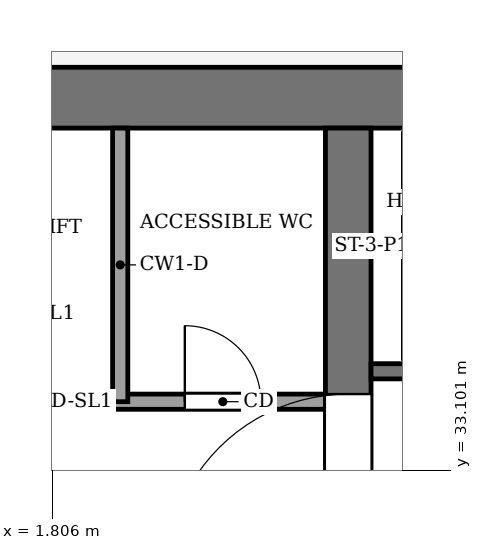
"""IFC4 building model, lengths in metres.
Left out: names, types, materials, properties, quantities, classifications, styles, units other than length and angle.
Written with IfcOpenShell. Run it as: python <this file> out.ifc"""

import sys

from ifc_helpers import new_model, si_unit, direction, frame, frame_2d, origin, place, context, subcontext, project, spatial, rectangle, extrude, element, fill, save


model = new_model("IFC4")
c1 = context("Model", 3, precision=1e-05, world=origin(), true_north=direction((0.0, 1.0)))
c2 = subcontext(c1, "Body", "Model", "MODEL_VIEW")
j1 = project(units=[si_unit("LENGTHUNIT", "METRE"), si_unit("PLANEANGLEUNIT", "RADIAN")], contexts=[c1])
p1 = place(None, origin())
s1 = spatial("IfcSite", under=j1, at=p1, CompositionType="ELEMENT")
p2 = place(p1, origin())
s2 = spatial("IfcBuilding", under=s1, at=p2, CompositionType="ELEMENT")
p3 = place(p2, frame((0.0, 0.0, 233.0)))
s3 = spatial("IfcBuildingStorey", under=s2, at=p3, CompositionType="ELEMENT", Elevation=233.0)
p4 = place(p3, frame((-13.4, 38.0, -0.13), z_axis=(0.0, 0.0, 1.0), x_axis=(1.0, 0.0, 0.0)))
e1 = element("IfcWall", 1, at=p4, inside=s3, PredefinedType="SHEAR", context=c2, shape_type="SweptSolid", body=[
    extrude(rectangle(XDim=26.8, YDim=0.8, at=frame_2d((13.4, 0.0))), origin(), (0.0, 0.0, 1.0), 5.0),
])
p5 = place(p3, frame((5.7, 18.4, -0.13), z_axis=(0.0, 0.0, 1.0), x_axis=(0.0, 1.0, 0.0)))
e2 = element("IfcWall", 2, at=p5, inside=s3, PredefinedType="SHEAR", context=c2, shape_type="SweptSolid", body=[
    extrude(rectangle(XDim=19.2, YDim=0.6, at=frame_2d((9.6, 0.0))), origin(), (0.0, 0.0, 1.0), 5.0),
])
p6 = place(p5, frame((13.3, 0.0, 0.13)))
e3 = element("IfcOpeningElement", 3, at=p6, cuts=e2, PredefinedType="OPENING", context=c2, shape_type="SweptSolid", body=[
    extrude(rectangle(XDim=2.4, YDim=2.4, at=frame_2d((1.2, 1.2))), frame((0.0, 0.31, 0.0), z_axis=(0.0, -1.0, 0.0), x_axis=(1.0, 0.0, 0.0)), (0.0, 0.0, 1.0), 0.62),
])
p7 = place(p3, frame((-5.4, 34.0, 0.0), z_axis=(0.0, 0.0, 1.0), x_axis=(1.0, 0.0, 0.0)))
e4 = element("IfcWall", 4, at=p7, inside=s3, PredefinedType="PARTITIONING", context=c2, shape_type="SweptSolid", body=[
    extrude(rectangle(XDim=10.8, YDim=0.2, at=frame_2d((5.4, 0.0))), origin(), (0.0, 0.0, 1.0), 4.87),
])
p8 = place(p7, frame((6.15, 0.0, 0.0)))
e5 = element("IfcOpeningElement", 5, at=p8, cuts=e4, PredefinedType="OPENING", context=c2, shape_type="SweptSolid", body=[
    extrude(rectangle(XDim=1.2, YDim=2.2, at=frame_2d((0.6, 1.1))), frame((0.0, 0.11, 0.0), z_axis=(0.0, -1.0, 0.0), x_axis=(1.0, 0.0, 0.0)), (0.0, 0.0, 1.0), 0.22),
])
p9 = place(p7, frame((8.95, 0.0, 0.0)))
e6 = element("IfcOpeningElement", 6, at=p9, cuts=e4, PredefinedType="OPENING", context=c2, shape_type="SweptSolid", body=[
    extrude(rectangle(XDim=1.0, YDim=2.1, at=frame_2d((0.5, 1.05))), frame((0.0, 0.11, 0.0), z_axis=(0.0, -1.0, 0.0), x_axis=(1.0, 0.0, 0.0)), (0.0, 0.0, 1.0), 0.22),
])
p10 = place(p3, frame((6.0, 34.4, 0.0), z_axis=(0.0, 0.0, 1.0), x_axis=(1.0, 0.0, 0.0)))
e7 = element("IfcWall", 7, at=p10, inside=s3, PredefinedType="PARTITIONING", context=c2, shape_type="SweptSolid", body=[
    extrude(rectangle(XDim=6.6, YDim=0.2, at=frame_2d((3.3, 0.0))), origin(), (0.0, 0.0, 1.0), 4.87),
])
p11 = place(p10, frame((4.8, 0.0, 0.0)))
e8 = element("IfcOpeningElement", 8, at=p11, cuts=e7, PredefinedType="OPENING", context=c2, shape_type="SweptSolid", body=[
    extrude(rectangle(XDim=1.2, YDim=2.2, at=frame_2d((0.6, 1.1))), frame((0.0, 0.11, 0.0), z_axis=(0.0, -1.0, 0.0), x_axis=(1.0, 0.0, 0.0)), (0.0, 0.0, 1.0), 0.22),
])
p12 = place(p3, frame((2.7, 34.0, 0.0), z_axis=(0.0, 0.0, 1.0), x_axis=(0.0, 1.0, 0.0)))
e9 = element("IfcWall", 9, at=p12, inside=s3, PredefinedType="PARTITIONING", context=c2, shape_type="SweptSolid", body=[
    extrude(rectangle(XDim=3.6, YDim=0.2, at=frame_2d((1.8, 0.0))), origin(), (0.0, 0.0, 1.0), 4.87),
])
p13 = place(p8, origin())
e10 = element("IfcDoor", 10, at=p13, inside=s3, OperationType="SLIDING_TO_LEFT", PredefinedType="DOOR", context=c2, shape_type="SweptSolid", body=[
    extrude(rectangle(XDim=1.2, YDim=2.2, at=frame_2d((0.6, 1.1))), frame((0.0, 0.025, 0.0), z_axis=(0.0, -1.0, 0.0), x_axis=(1.0, 0.0, 0.0)), (0.0, 0.0, 1.0), 0.05),
])
fill(e5, e10)
p14 = place(p9, origin())
e11 = element("IfcDoor", 11, at=p14, inside=s3, OperationType="SINGLE_SWING_LEFT", PredefinedType="DOOR", context=c2, shape_type="SweptSolid", body=[
    extrude(rectangle(XDim=1.0, YDim=2.1, at=frame_2d((0.5, 1.05))), frame((0.0, 0.025, 0.0), z_axis=(0.0, -1.0, 0.0), x_axis=(1.0, 0.0, 0.0)), (0.0, 0.0, 1.0), 0.05),
])
fill(e6, e11)
p15 = place(p6, origin())
e12 = element("IfcDoor", 12, at=p15, inside=s3, OperationType="DOUBLE_DOOR_SINGLE_SWING", PredefinedType="DOOR", context=c2, shape_type="SweptSolid", body=[
    extrude(rectangle(XDim=2.4, YDim=2.4, at=frame_2d((1.2, 1.2))), frame((0.0, 0.025, 0.0), z_axis=(0.0, -1.0, 0.0), x_axis=(1.0, 0.0, 0.0)), (0.0, 0.0, 1.0), 0.05),
])
fill(e3, e12)
save(model, sys.argv[1])
